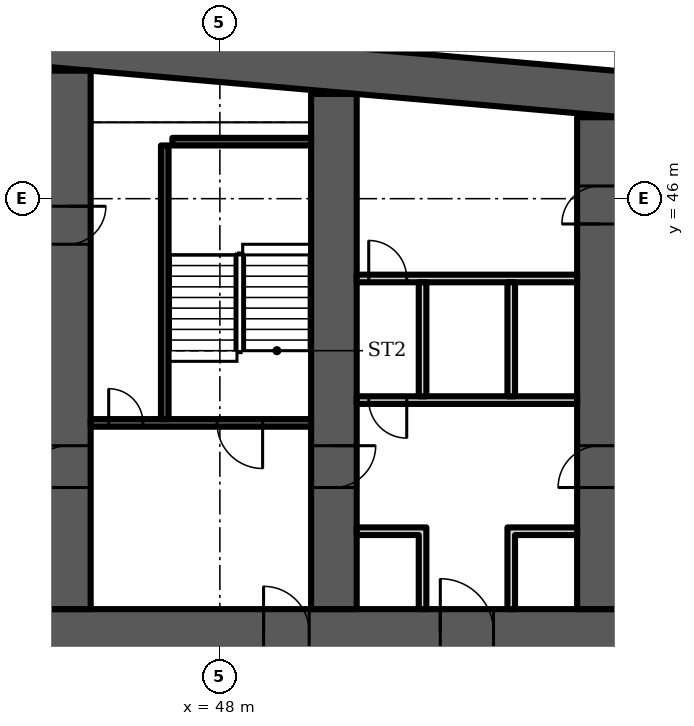
"""IFC4 building model, lengths in metres.
Left out: names, types, materials, properties, quantities, classifications, styles, units other than length and angle.
Written with IfcOpenShell. Run it as: python <this file> out.ifc"""

import sys

from ifc_helpers import new_model, si_unit, direction, frame, frame_2d, origin, place, context, subcontext, project, spatial, polyline, rectangle, outline, extrude, element, fill, save


model = new_model("IFC4")
c1 = context("Model", 3, precision=1e-05, world=origin(), true_north=direction((0.0, 1.0)))
c2 = subcontext(c1, "Body", "Model", "MODEL_VIEW")
j1 = project(units=[si_unit("LENGTHUNIT", "METRE"), si_unit("PLANEANGLEUNIT", "RADIAN")], contexts=[c1])
p1 = place(None, origin())
s1 = spatial("IfcSite", under=j1, at=p1, CompositionType="ELEMENT")
p2 = place(p1, origin())
s2 = spatial("IfcBuilding", under=s1, at=p2, CompositionType="ELEMENT")
p3 = place(p2, frame((0.0, 0.0, 41.5)))
s3 = spatial("IfcBuildingStorey", under=s2, at=p3, CompositionType="ELEMENT", Elevation=41.5)
p4 = place(p3, origin())
e1 = element("IfcWall", 1, at=p4, inside=s3, PredefinedType="SHEAR", context=c2, shape_type="SweptSolid", body=[
    extrude(outline(polyline([(9.0, 47.583), (37.0, 50.032), (65.0, 47.583), (65.0, 48.787), (37.0, 51.237), (9.0, 48.787), (9.0, 47.583)])), origin(), (0.0, 0.0, 1.0), 3.6),
])
p5 = place(p3, frame((9.0, 34.6, 0.0), z_axis=(0.0, 0.0, 1.0), x_axis=(1.0, 0.0, 0.0)))
e2 = element("IfcWall", 2, at=p5, inside=s3, PredefinedType="SHEAR", context=c2, shape_type="SweptSolid", body=[
    extrude(rectangle(XDim=56.0, YDim=1.2, at=frame_2d((28.0, 0.0))), origin(), (0.0, 0.0, 1.0), 3.6),
])
p6 = place(p5, frame((3.3, 0.0, 0.0)))
e3 = element("IfcOpeningElement", 3, at=p6, cuts=e2, PredefinedType="OPENING", context=c2, shape_type="SweptSolid", body=[
    extrude(rectangle(XDim=1.0, YDim=2.1, at=frame_2d((0.5, 1.05))), frame((0.0, 0.61, 0.0), z_axis=(0.0, -1.0, 0.0), x_axis=(1.0, 0.0, 0.0)), (0.0, 0.0, 1.0), 1.22),
])
p7 = place(p5, frame((7.867, 0.0, 0.0)))
e4 = element("IfcOpeningElement", 4, at=p7, cuts=e2, PredefinedType="OPENING", context=c2, shape_type="SweptSolid", body=[
    extrude(rectangle(XDim=1.1, YDim=2.1, at=frame_2d((0.55, 1.05))), frame((0.0, 0.61, 0.0), z_axis=(0.0, -1.0, 0.0), x_axis=(1.0, 0.0, 0.0)), (0.0, 0.0, 1.0), 1.22),
])
p8 = place(p5, frame((12.033, 0.0, 0.0)))
e5 = element("IfcOpeningElement", 5, at=p8, cuts=e2, PredefinedType="OPENING", context=c2, shape_type="SweptSolid", body=[
    extrude(rectangle(XDim=1.1, YDim=2.1, at=frame_2d((0.55, 1.05))), frame((0.0, 0.61, 0.0), z_axis=(0.0, -1.0, 0.0), x_axis=(1.0, 0.0, 0.0)), (0.0, 0.0, 1.0), 1.22),
])
p9 = place(p5, frame((9.8, 0.0, 0.0)))
e6 = element("IfcOpeningElement", 6, at=p9, cuts=e2, PredefinedType="OPENING", context=c2, shape_type="SweptSolid", body=[
    extrude(rectangle(XDim=1.4, YDim=2.1, at=frame_2d((0.7, 1.05))), frame((0.0, 0.61, 0.0), z_axis=(0.0, -1.0, 0.0), x_axis=(1.0, 0.0, 0.0)), (0.0, 0.0, 1.0), 1.22),
])
p10 = place(p5, frame((14.65, 0.0, 0.0)))
e7 = element("IfcOpeningElement", 7, at=p10, cuts=e2, PredefinedType="OPENING", context=c2, shape_type="SweptSolid", body=[
    extrude(rectangle(XDim=1.2, YDim=2.1, at=frame_2d((0.6, 1.05))), frame((0.0, 0.61, 0.0), z_axis=(0.0, -1.0, 0.0), x_axis=(1.0, 0.0, 0.0)), (0.0, 0.0, 1.0), 1.22),
])
p11 = place(p5, frame((21.867, 0.0, 0.0)))
e8 = element("IfcOpeningElement", 8, at=p11, cuts=e2, PredefinedType="OPENING", context=c2, shape_type="SweptSolid", body=[
    extrude(rectangle(XDim=1.1, YDim=2.1, at=frame_2d((0.55, 1.05))), frame((0.0, 0.61, 0.0), z_axis=(0.0, -1.0, 0.0), x_axis=(1.0, 0.0, 0.0)), (0.0, 0.0, 1.0), 1.22),
])
p12 = place(p5, frame((26.033, 0.0, 0.0)))
e9 = element("IfcOpeningElement", 9, at=p12, cuts=e2, PredefinedType="OPENING", context=c2, shape_type="SweptSolid", body=[
    extrude(rectangle(XDim=1.1, YDim=2.1, at=frame_2d((0.55, 1.05))), frame((0.0, 0.61, 0.0), z_axis=(0.0, -1.0, 0.0), x_axis=(1.0, 0.0, 0.0)), (0.0, 0.0, 1.0), 1.22),
])
p13 = place(p5, frame((23.8, 0.0, 0.0)))
e10 = element("IfcOpeningElement", 10, at=p13, cuts=e2, PredefinedType="OPENING", context=c2, shape_type="SweptSolid", body=[
    extrude(rectangle(XDim=1.4, YDim=2.1, at=frame_2d((0.7, 1.05))), frame((0.0, 0.61, 0.0), z_axis=(0.0, -1.0, 0.0), x_axis=(1.0, 0.0, 0.0)), (0.0, 0.0, 1.0), 1.22),
])
p14 = place(p5, frame((28.867, 0.0, 0.0)))
e11 = element("IfcOpeningElement", 11, at=p14, cuts=e2, PredefinedType="OPENING", context=c2, shape_type="SweptSolid", body=[
    extrude(rectangle(XDim=1.1, YDim=2.1, at=frame_2d((0.55, 1.05))), frame((0.0, 0.61, 0.0), z_axis=(0.0, -1.0, 0.0), x_axis=(1.0, 0.0, 0.0)), (0.0, 0.0, 1.0), 1.22),
])
p15 = place(p5, frame((33.033, 0.0, 0.0)))
e12 = element("IfcOpeningElement", 12, at=p15, cuts=e2, PredefinedType="OPENING", context=c2, shape_type="SweptSolid", body=[
    extrude(rectangle(XDim=1.1, YDim=2.1, at=frame_2d((0.55, 1.05))), frame((0.0, 0.61, 0.0), z_axis=(0.0, -1.0, 0.0), x_axis=(1.0, 0.0, 0.0)), (0.0, 0.0, 1.0), 1.22),
])
p16 = place(p5, frame((40.15, 0.0, 0.0)))
e13 = element("IfcOpeningElement", 13, at=p16, cuts=e2, PredefinedType="OPENING", context=c2, shape_type="SweptSolid", body=[
    extrude(rectangle(XDim=1.2, YDim=2.1, at=frame_2d((0.6, 1.05))), frame((0.0, 0.61, 0.0), z_axis=(0.0, -1.0, 0.0), x_axis=(1.0, 0.0, 0.0)), (0.0, 0.0, 1.0), 1.22),
])
p17 = place(p5, frame((44.8, 0.0, 0.0)))
e14 = element("IfcOpeningElement", 14, at=p17, cuts=e2, PredefinedType="OPENING", context=c2, shape_type="SweptSolid", body=[
    extrude(rectangle(XDim=1.4, YDim=2.1, at=frame_2d((0.7, 1.05))), frame((0.0, 0.61, 0.0), z_axis=(0.0, -1.0, 0.0), x_axis=(1.0, 0.0, 0.0)), (0.0, 0.0, 1.0), 1.22),
])
p18 = place(p5, frame((49.867, 0.0, 0.0)))
e15 = element("IfcOpeningElement", 15, at=p18, cuts=e2, PredefinedType="OPENING", context=c2, shape_type="SweptSolid", body=[
    extrude(rectangle(XDim=1.1, YDim=2.1, at=frame_2d((0.55, 1.05))), frame((0.0, 0.61, 0.0), z_axis=(0.0, -1.0, 0.0), x_axis=(1.0, 0.0, 0.0)), (0.0, 0.0, 1.0), 1.22),
])
p19 = place(p5, frame((53.5, 0.0, 0.0)))
e16 = element("IfcOpeningElement", 16, at=p19, cuts=e2, PredefinedType="OPENING", context=c2, shape_type="SweptSolid", body=[
    extrude(rectangle(XDim=1.1, YDim=2.1, at=frame_2d((0.55, 1.05))), frame((0.0, 0.61, 0.0), z_axis=(0.0, -1.0, 0.0), x_axis=(1.0, 0.0, 0.0)), (0.0, 0.0, 1.0), 1.22),
])
p20 = place(p5, frame((51.567, 0.0, 0.0)))
e17 = element("IfcOpeningElement", 17, at=p20, cuts=e2, PredefinedType="OPENING", context=c2, shape_type="SweptSolid", body=[
    extrude(rectangle(XDim=1.4, YDim=2.1, at=frame_2d((0.7, 1.05))), frame((0.0, 0.61, 0.0), z_axis=(0.0, -1.0, 0.0), x_axis=(1.0, 0.0, 0.0)), (0.0, 0.0, 1.0), 1.22),
])
p21 = place(p3, frame((44.0, 35.2, 0.0), z_axis=(0.0, 0.0, 1.0), x_axis=(0.0, 1.0, 0.0)))
e18 = element("IfcWall", 18, at=p21, inside=s3, PredefinedType="SHEAR", context=c2, shape_type="SweptSolid", body=[
    extrude(rectangle(XDim=14.168, YDim=1.2, at=frame_2d((7.084, 0.0))), origin(), (0.0, 0.0, 1.0), 3.6),
])
p22 = place(p21, frame((3.2, 0.0, 0.0)))
e19 = element("IfcOpeningElement", 19, at=p22, cuts=e18, PredefinedType="OPENING", context=c2, shape_type="SweptSolid", body=[
    extrude(rectangle(XDim=1.1, YDim=2.1, at=frame_2d((0.55, 1.05))), frame((0.0, 0.61, 0.0), z_axis=(0.0, -1.0, 0.0), x_axis=(1.0, 0.0, 0.0)), (0.0, 0.0, 1.0), 1.22),
])
p23 = place(p21, frame((9.6, 0.0, 0.0)))
e20 = element("IfcOpeningElement", 20, at=p23, cuts=e18, PredefinedType="OPENING", context=c2, shape_type="SweptSolid", body=[
    extrude(rectangle(XDim=1.0, YDim=2.1, at=frame_2d((0.5, 1.05))), frame((0.0, 0.61, 0.0), z_axis=(0.0, -1.0, 0.0), x_axis=(1.0, 0.0, 0.0)), (0.0, 0.0, 1.0), 1.22),
])
p24 = place(p3, frame((51.0, 35.2, 0.0), z_axis=(0.0, 0.0, 1.0), x_axis=(0.0, 1.0, 0.0)))
e21 = element("IfcWall", 21, at=p24, inside=s3, PredefinedType="SHEAR", context=c2, shape_type="SweptSolid", body=[
    extrude(rectangle(XDim=13.555, YDim=1.2, at=frame_2d((6.778, 0.0))), origin(), (0.0, 0.0, 1.0), 3.6),
])
p25 = place(p24, frame((3.2, 0.0, 0.0)))
e22 = element("IfcOpeningElement", 22, at=p25, cuts=e21, PredefinedType="OPENING", context=c2, shape_type="SweptSolid", body=[
    extrude(rectangle(XDim=1.1, YDim=2.1, at=frame_2d((0.55, 1.05))), frame((0.0, 0.61, 0.0), z_axis=(0.0, -1.0, 0.0), x_axis=(1.0, 0.0, 0.0)), (0.0, 0.0, 1.0), 1.22),
])
p26 = place(p3, frame((58.0, 35.2, 0.0), z_axis=(0.0, 0.0, 1.0), x_axis=(0.0, 1.0, 0.0)))
e23 = element("IfcWall", 23, at=p26, inside=s3, PredefinedType="SHEAR", context=c2, shape_type="SweptSolid", body=[
    extrude(rectangle(XDim=12.943, YDim=1.2, at=frame_2d((6.471, 0.0))), origin(), (0.0, 0.0, 1.0), 3.6),
])
p27 = place(p26, frame((10.134, 0.0, 0.0)))
e24 = element("IfcOpeningElement", 24, at=p27, cuts=e23, PredefinedType="OPENING", context=c2, shape_type="SweptSolid", body=[
    extrude(rectangle(XDim=1.0, YDim=2.1, at=frame_2d((0.5, 1.05))), frame((0.0, 0.61, 0.0), z_axis=(0.0, -1.0, 0.0), x_axis=(1.0, 0.0, 0.0)), (0.0, 0.0, 1.0), 1.22),
])
p28 = place(p26, frame((3.2, 0.0, 0.0)))
e25 = element("IfcOpeningElement", 25, at=p28, cuts=e23, PredefinedType="OPENING", context=c2, shape_type="SweptSolid", body=[
    extrude(rectangle(XDim=1.1, YDim=2.1, at=frame_2d((0.55, 1.05))), frame((0.0, 0.61, 0.0), z_axis=(0.0, -1.0, 0.0), x_axis=(1.0, 0.0, 0.0)), (0.0, 0.0, 1.0), 1.22),
])
p29 = place(p3, frame((44.6, 40.1, 0.0), z_axis=(0.0, 0.0, 1.0), x_axis=(1.0, 0.0, 0.0)))
e26 = element("IfcWall", 26, at=p29, inside=s3, PredefinedType="SHEAR", context=c2, shape_type="SweptSolid", body=[
    extrude(rectangle(XDim=5.8, YDim=0.2, at=frame_2d((2.9, 0.0))), origin(), (0.0, 0.0, 1.0), 3.2),
])
p30 = place(p29, frame((3.325, 0.0, 0.0)))
e27 = element("IfcOpeningElement", 27, at=p30, cuts=e26, PredefinedType="OPENING", context=c2, shape_type="SweptSolid", body=[
    extrude(rectangle(XDim=1.2, YDim=2.1, at=frame_2d((0.6, 1.05))), frame((0.0, 0.11, 0.0), z_axis=(0.0, -1.0, 0.0), x_axis=(1.0, 0.0, 0.0)), (0.0, 0.0, 1.0), 0.22),
])
p31 = place(p29, frame((0.475, 0.0, 0.0)))
e28 = element("IfcOpeningElement", 28, at=p31, cuts=e26, PredefinedType="OPENING", context=c2, shape_type="SweptSolid", body=[
    extrude(rectangle(XDim=0.9, YDim=2.1, at=frame_2d((0.45, 1.05))), frame((0.0, 0.11, 0.0), z_axis=(0.0, -1.0, 0.0), x_axis=(1.0, 0.0, 0.0)), (0.0, 0.0, 1.0), 0.22),
])
p32 = place(p3, frame((46.55, 40.2, 0.0), z_axis=(0.0, 0.0, 1.0), x_axis=(0.0, 1.0, 0.0)))
e29 = element("IfcWall", 29, at=p32, inside=s3, PredefinedType="SHEAR", context=c2, shape_type="SweptSolid", body=[
    extrude(rectangle(XDim=7.2, YDim=0.2, at=frame_2d((3.6, 0.0))), origin(), (0.0, 0.0, 1.0), 3.2),
])
p33 = place(p3, frame((46.75, 47.5, 0.0), z_axis=(0.0, 0.0, 1.0), x_axis=(1.0, 0.0, 0.0)))
e30 = element("IfcWall", 30, at=p33, inside=s3, PredefinedType="SHEAR", context=c2, shape_type="SweptSolid", body=[
    extrude(rectangle(XDim=3.65, YDim=0.2, at=frame_2d((1.825, 0.0))), origin(), (0.0, 0.0, 1.0), 3.2),
])
p34 = place(p3, frame((51.6, 40.7, 0.0), z_axis=(0.0, 0.0, 1.0), x_axis=(1.0, 0.0, 0.0)))
e31 = element("IfcWall", 31, at=p34, inside=s3, PredefinedType="PARTITIONING", context=c2, shape_type="SweptSolid", body=[
    extrude(rectangle(XDim=5.8, YDim=0.2, at=frame_2d((2.9, 0.0))), origin(), (0.0, 0.0, 1.0), 3.2),
])
p35 = place(p34, frame((0.317, 0.0, 0.0)))
e32 = element("IfcOpeningElement", 32, at=p35, cuts=e31, PredefinedType="OPENING", context=c2, shape_type="SweptSolid", body=[
    extrude(rectangle(XDim=1.0, YDim=2.1, at=frame_2d((0.5, 1.05))), frame((0.0, 0.11, 0.0), z_axis=(0.0, -1.0, 0.0), x_axis=(1.0, 0.0, 0.0)), (0.0, 0.0, 1.0), 0.22),
])
p36 = place(p3, frame((51.6, 43.9, 0.0), z_axis=(0.0, 0.0, 1.0), x_axis=(1.0, 0.0, 0.0)))
e33 = element("IfcWall", 33, at=p36, inside=s3, PredefinedType="PARTITIONING", context=c2, shape_type="SweptSolid", body=[
    extrude(rectangle(XDim=5.8, YDim=0.2, at=frame_2d((2.9, 0.0))), origin(), (0.0, 0.0, 1.0), 3.2),
])
p37 = place(p36, frame((0.317, 0.0, 0.0)))
e34 = element("IfcOpeningElement", 34, at=p37, cuts=e33, PredefinedType="OPENING", context=c2, shape_type="SweptSolid", body=[
    extrude(rectangle(XDim=1.0, YDim=2.1, at=frame_2d((0.5, 1.05))), frame((0.0, 0.11, 0.0), z_axis=(0.0, -1.0, 0.0), x_axis=(1.0, 0.0, 0.0)), (0.0, 0.0, 1.0), 0.22),
])
p38 = place(p3, frame((0.0, 0.0, -0.0)))
e35 = element("IfcWall", 35, at=p38, inside=s3, PredefinedType="PARTITIONING", context=c2, shape_type="SweptSolid", body=[
    extrude(outline(polyline([(53.233, 37.15), (51.6, 37.15), (51.6, 37.35), (53.233, 37.35), (53.433, 37.35), (53.433, 35.2), (53.233, 35.2), (53.233, 37.15)])), origin(), (0.0, 0.0, 1.0), 3.2),
])
p39 = place(p3, frame((0.0, 0.0, -0.0)))
e36 = element("IfcWall", 36, at=p39, inside=s3, PredefinedType="PARTITIONING", context=c2, shape_type="SweptSolid", body=[
    extrude(outline(polyline([(55.567, 37.35), (55.767, 37.35), (57.4, 37.35), (57.4, 37.15), (55.767, 37.15), (55.767, 35.2), (55.567, 35.2), (55.567, 37.35)])), origin(), (0.0, 0.0, 1.0), 3.2),
])
p40 = place(p3, frame((0.0, 0.0, -0.0)))
e37 = element("IfcWall", 37, at=p40, inside=s3, PredefinedType="PARTITIONING", context=c2, shape_type="SweptSolid", body=[
    extrude(outline(polyline([(53.233, 40.8), (53.233, 43.8), (53.433, 43.8), (53.433, 40.8), (53.233, 40.8)])), origin(), (0.0, 0.0, 1.0), 3.2),
])
p41 = place(p3, frame((0.0, 0.0, -0.0)))
e38 = element("IfcWall", 38, at=p41, inside=s3, PredefinedType="PARTITIONING", context=c2, shape_type="SweptSolid", body=[
    extrude(outline(polyline([(55.567, 40.8), (55.567, 43.8), (55.767, 43.8), (55.767, 40.8), (55.567, 40.8)])), origin(), (0.0, 0.0, 1.0), 3.2),
])
p42 = place(p30, origin())
e39 = element("IfcDoor", 39, at=p42, inside=s3, OperationType="SINGLE_SWING_RIGHT", PredefinedType="DOOR", context=c2, shape_type="SweptSolid", body=[
    extrude(rectangle(XDim=1.2, YDim=2.1, at=frame_2d((0.6, 1.05))), frame((0.0, 0.025, 0.0), z_axis=(0.0, -1.0, 0.0), x_axis=(1.0, 0.0, 0.0)), (0.0, 0.0, 1.0), 0.05),
])
fill(e27, e39)
p43 = place(p31, origin())
e40 = element("IfcDoor", 40, at=p43, inside=s3, OperationType="SINGLE_SWING_LEFT", PredefinedType="DOOR", context=c2, shape_type="SweptSolid", body=[
    extrude(rectangle(XDim=0.9, YDim=2.1, at=frame_2d((0.45, 1.05))), frame((0.0, 0.025, 0.0), z_axis=(0.0, -1.0, 0.0), x_axis=(1.0, 0.0, 0.0)), (0.0, 0.0, 1.0), 0.05),
])
fill(e28, e40)
p44 = place(p16, origin())
e41 = element("IfcDoor", 41, at=p44, inside=s3, OperationType="SINGLE_SWING_LEFT", PredefinedType="DOOR", context=c2, shape_type="SweptSolid", body=[
    extrude(rectangle(XDim=1.2, YDim=2.1, at=frame_2d((0.6, 1.05))), frame((0.0, 0.025, 0.0), z_axis=(0.0, -1.0, 0.0), x_axis=(1.0, 0.0, 0.0)), (0.0, 0.0, 1.0), 0.05),
])
fill(e13, e41)
p45 = place(p17, origin())
e42 = element("IfcDoor", 42, at=p45, inside=s3, OperationType="DOUBLE_DOOR_SINGLE_SWING", PredefinedType="DOOR", context=c2, shape_type="SweptSolid", body=[
    extrude(rectangle(XDim=1.4, YDim=2.1, at=frame_2d((0.7, 1.05))), frame((0.0, 0.025, 0.0), z_axis=(0.0, -1.0, 0.0), x_axis=(1.0, 0.0, 0.0)), (0.0, 0.0, 1.0), 0.05),
])
fill(e14, e42)
p46 = place(p35, origin())
e43 = element("IfcDoor", 43, at=p46, inside=s3, OperationType="SINGLE_SWING_RIGHT", PredefinedType="DOOR", context=c2, shape_type="SweptSolid", body=[
    extrude(rectangle(XDim=1.0, YDim=2.1, at=frame_2d((0.5, 1.05))), frame((0.0, 0.025, 0.0), z_axis=(0.0, -1.0, 0.0), x_axis=(1.0, 0.0, 0.0)), (0.0, 0.0, 1.0), 0.05),
])
fill(e32, e43)
p47 = place(p37, origin())
e44 = element("IfcDoor", 44, at=p47, inside=s3, OperationType="SINGLE_SWING_LEFT", PredefinedType="DOOR", context=c2, shape_type="SweptSolid", body=[
    extrude(rectangle(XDim=1.0, YDim=2.1, at=frame_2d((0.5, 1.05))), frame((0.0, 0.025, 0.0), z_axis=(0.0, -1.0, 0.0), x_axis=(1.0, 0.0, 0.0)), (0.0, 0.0, 1.0), 0.05),
])
fill(e34, e44)
p48 = place(p27, origin())
e45 = element("IfcDoor", 45, at=p48, inside=s3, OperationType="SINGLE_SWING_LEFT", PredefinedType="DOOR", context=c2, shape_type="SweptSolid", body=[
    extrude(rectangle(XDim=1.0, YDim=2.1, at=frame_2d((0.5, 1.05))), frame((0.0, 0.6, 0.0), z_axis=(0.0, -1.0, 0.0), x_axis=(1.0, 0.0, 0.0)), (0.0, 0.0, 1.0), 1.199),
])
fill(e24, e45)
p49 = place(p22, origin())
e46 = element("IfcDoor", 46, at=p49, inside=s3, OperationType="SINGLE_SWING_LEFT", PredefinedType="DOOR", context=c2, shape_type="SweptSolid", body=[
    extrude(rectangle(XDim=1.1, YDim=2.1, at=frame_2d((0.55, 1.05))), frame((0.0, 0.025, 0.0), z_axis=(0.0, -1.0, 0.0), x_axis=(1.0, 0.0, 0.0)), (0.0, 0.0, 1.0), 0.05),
])
fill(e19, e46)
p50 = place(p23, origin())
e47 = element("IfcDoor", 47, at=p50, inside=s3, OperationType="SINGLE_SWING_RIGHT", PredefinedType="DOOR", context=c2, shape_type="SweptSolid", body=[
    extrude(rectangle(XDim=1.0, YDim=2.1, at=frame_2d((0.5, 1.05))), frame((0.0, 0.6, 0.0), z_axis=(0.0, -1.0, 0.0), x_axis=(1.0, 0.0, 0.0)), (0.0, 0.0, 1.0), 1.199),
])
fill(e20, e47)
p51 = place(p25, origin())
e48 = element("IfcDoor", 48, at=p51, inside=s3, OperationType="SINGLE_SWING_RIGHT", PredefinedType="DOOR", context=c2, shape_type="SweptSolid", body=[
    extrude(rectangle(XDim=1.1, YDim=2.1, at=frame_2d((0.55, 1.05))), frame((0.0, 0.025, 0.0), z_axis=(0.0, -1.0, 0.0), x_axis=(1.0, 0.0, 0.0)), (0.0, 0.0, 1.0), 0.05),
])
fill(e22, e48)
p52 = place(p28, origin())
e49 = element("IfcDoor", 49, at=p52, inside=s3, OperationType="SINGLE_SWING_LEFT", PredefinedType="DOOR", context=c2, shape_type="SweptSolid", body=[
    extrude(rectangle(XDim=1.1, YDim=2.1, at=frame_2d((0.55, 1.05))), frame((0.0, 0.025, 0.0), z_axis=(0.0, -1.0, 0.0), x_axis=(1.0, 0.0, 0.0)), (0.0, 0.0, 1.0), 0.05),
])
fill(e25, e49)
save(model, sys.argv[1])
